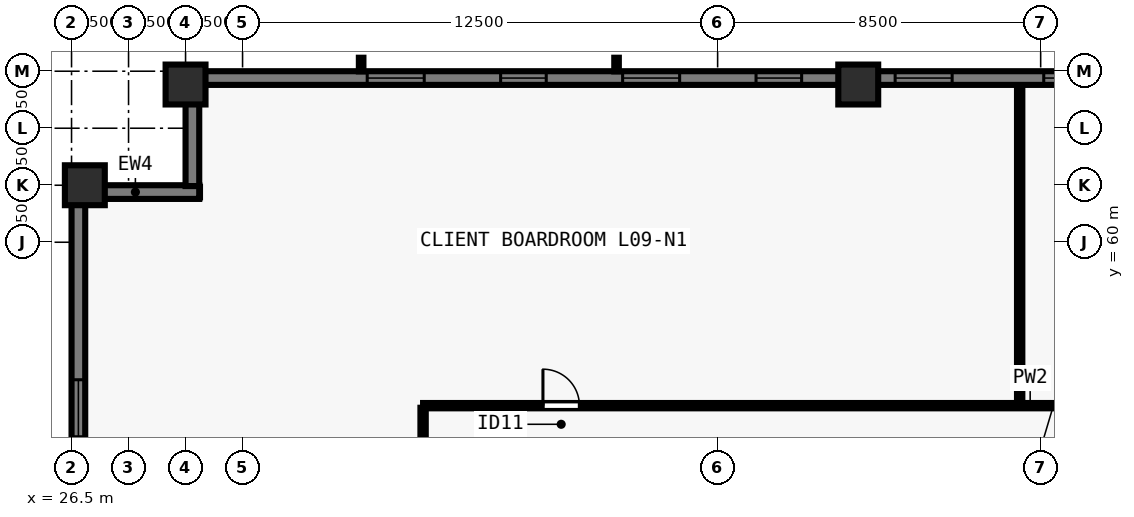
"""IFC4 building model, lengths in metres.
Left out: names, types, materials, properties, quantities, classifications, styles, units other than length and angle.
Written with IfcOpenShell. Run it as: python <this file> out.ifc"""

import sys

from ifc_helpers import new_model, si_unit, direction, frame, frame_2d, origin, origin_2d, place, context, subcontext, project, spatial, rectangle, extrude, element, fill, save


model = new_model("IFC4")
c1 = context("Model", 3, precision=1e-05, world=origin(), true_north=direction((0.0, 1.0)))
c2 = subcontext(c1, "Body", "Model", "MODEL_VIEW")
j1 = project(units=[si_unit("LENGTHUNIT", "METRE"), si_unit("PLANEANGLEUNIT", "RADIAN")], contexts=[c1])
p1 = place(None, origin())
s1 = spatial("IfcSite", under=j1, at=p1, CompositionType="ELEMENT")
p2 = place(p1, origin())
s2 = spatial("IfcBuilding", under=s1, at=p2, CompositionType="ELEMENT")
p3 = place(p2, frame((0.0, 0.0, 37.5)))
s3 = spatial("IfcBuildingStorey", under=s2, at=p3, CompositionType="ELEMENT", Elevation=37.5)
for number, where, z_axis, x_axis in (
    (1, (47.2, 64.15, 0.0), (0.0, 0.0, 1.0), (1.0, 0.0, 0.0)),
    (2, (29.5, 64.15, 0.0), (0.0, 0.0, 1.0), (1.0, 0.0, 0.0)),
    (3, (26.85, 61.5, 0.0), (0.0, 0.0, 1.0), (0.0, 1.0, 0.0)),
):
    element("IfcColumn", number, at=place(p3, frame(where, z_axis=z_axis, x_axis=x_axis)), inside=s3, PredefinedType="COLUMN", context=c2, shape_type="SweptSolid", body=[
        extrude(rectangle(XDim=1.05, YDim=1.05, at=origin_2d()), origin(), (0.0, 0.0, 1.0), 3.5),
    ])
p4 = place(p3, frame((26.68, 16.5, 0.0), z_axis=(0.0, 0.0, 1.0), x_axis=(0.0, 1.0, 0.0)))
e4 = element("IfcWall", 4, at=p4, inside=s3, PredefinedType="SOLIDWALL", context=c2, shape_type="SweptSolid", body=[
    extrude(rectangle(XDim=44.662, YDim=0.36, at=frame_2d((22.331, 0.0))), origin(), (0.0, 0.0, 1.0), 3.28),
])
p5 = place(p4, frame((4.78, 0.0, 0.8)))
e5 = element("IfcOpeningElement", 5, at=p5, cuts=e4, PredefinedType="OPENING", context=c2, shape_type="SweptSolid", body=[
    extrude(rectangle(XDim=1.5, YDim=1.544, at=frame_2d((0.75, 0.772))), frame((0.0, 0.19, 0.0), z_axis=(0.0, -1.0, 0.0), x_axis=(1.0, 0.0, 0.0)), (0.0, 0.0, 1.0), 0.38),
])
p6 = place(p4, frame((8.29, 0.0, 0.8)))
e6 = element("IfcOpeningElement", 6, at=p6, cuts=e4, PredefinedType="OPENING", context=c2, shape_type="SweptSolid", body=[
    extrude(rectangle(XDim=1.2, YDim=1.544, at=frame_2d((0.6, 0.772))), frame((0.0, 0.19, 0.0), z_axis=(0.0, -1.0, 0.0), x_axis=(1.0, 0.0, 0.0)), (0.0, 0.0, 1.0), 0.38),
])
p7 = place(p4, frame((11.5, 0.0, 0.8)))
e7 = element("IfcOpeningElement", 7, at=p7, cuts=e4, PredefinedType="OPENING", context=c2, shape_type="SweptSolid", body=[
    extrude(rectangle(XDim=1.5, YDim=1.544, at=frame_2d((0.75, 0.772))), frame((0.0, 0.19, 0.0), z_axis=(0.0, -1.0, 0.0), x_axis=(1.0, 0.0, 0.0)), (0.0, 0.0, 1.0), 0.38),
])
p8 = place(p4, frame((15.01, 0.0, 0.8)))
e8 = element("IfcOpeningElement", 8, at=p8, cuts=e4, PredefinedType="OPENING", context=c2, shape_type="SweptSolid", body=[
    extrude(rectangle(XDim=1.2, YDim=1.544, at=frame_2d((0.6, 0.772))), frame((0.0, 0.19, 0.0), z_axis=(0.0, -1.0, 0.0), x_axis=(1.0, 0.0, 0.0)), (0.0, 0.0, 1.0), 0.38),
])
p9 = place(p4, frame((18.671, 0.0, 0.8)))
e9 = element("IfcOpeningElement", 9, at=p9, cuts=e4, PredefinedType="OPENING", context=c2, shape_type="SweptSolid", body=[
    extrude(rectangle(XDim=1.5, YDim=1.544, at=frame_2d((0.75, 0.772))), frame((0.0, 0.19, 0.0), z_axis=(0.0, -1.0, 0.0), x_axis=(1.0, 0.0, 0.0)), (0.0, 0.0, 1.0), 0.38),
])
p10 = place(p4, frame((21.281, 0.0, 0.8)))
e10 = element("IfcOpeningElement", 10, at=p10, cuts=e4, PredefinedType="OPENING", context=c2, shape_type="SweptSolid", body=[
    extrude(rectangle(XDim=1.2, YDim=1.544, at=frame_2d((0.6, 0.772))), frame((0.0, 0.19, 0.0), z_axis=(0.0, -1.0, 0.0), x_axis=(1.0, 0.0, 0.0)), (0.0, 0.0, 1.0), 0.38),
])
p11 = place(p4, frame((24.941, 0.0, 0.8)))
e11 = element("IfcOpeningElement", 11, at=p11, cuts=e4, PredefinedType="OPENING", context=c2, shape_type="SweptSolid", body=[
    extrude(rectangle(XDim=1.5, YDim=1.544, at=frame_2d((0.75, 0.772))), frame((0.0, 0.19, 0.0), z_axis=(0.0, -1.0, 0.0), x_axis=(1.0, 0.0, 0.0)), (0.0, 0.0, 1.0), 0.38),
])
p12 = place(p4, frame((28.451, 0.0, 0.8)))
e12 = element("IfcOpeningElement", 12, at=p12, cuts=e4, PredefinedType="OPENING", context=c2, shape_type="SweptSolid", body=[
    extrude(rectangle(XDim=1.2, YDim=1.544, at=frame_2d((0.6, 0.772))), frame((0.0, 0.19, 0.0), z_axis=(0.0, -1.0, 0.0), x_axis=(1.0, 0.0, 0.0)), (0.0, 0.0, 1.0), 0.38),
])
p13 = place(p4, frame((31.662, 0.0, 0.8)))
e13 = element("IfcOpeningElement", 13, at=p13, cuts=e4, PredefinedType="OPENING", context=c2, shape_type="SweptSolid", body=[
    extrude(rectangle(XDim=1.5, YDim=1.544, at=frame_2d((0.75, 0.772))), frame((0.0, 0.19, 0.0), z_axis=(0.0, -1.0, 0.0), x_axis=(1.0, 0.0, 0.0)), (0.0, 0.0, 1.0), 0.38),
])
p14 = place(p4, frame((35.172, 0.0, 0.8)))
e14 = element("IfcOpeningElement", 14, at=p14, cuts=e4, PredefinedType="OPENING", context=c2, shape_type="SweptSolid", body=[
    extrude(rectangle(XDim=1.2, YDim=1.544, at=frame_2d((0.6, 0.772))), frame((0.0, 0.19, 0.0), z_axis=(0.0, -1.0, 0.0), x_axis=(1.0, 0.0, 0.0)), (0.0, 0.0, 1.0), 0.38),
])
p15 = place(p4, frame((38.382, 0.0, 0.8)))
e15 = element("IfcOpeningElement", 15, at=p15, cuts=e4, PredefinedType="OPENING", context=c2, shape_type="SweptSolid", body=[
    extrude(rectangle(XDim=1.5, YDim=1.544, at=frame_2d((0.75, 0.772))), frame((0.0, 0.19, 0.0), z_axis=(0.0, -1.0, 0.0), x_axis=(1.0, 0.0, 0.0)), (0.0, 0.0, 1.0), 0.38),
])
p16 = place(p3, frame((26.5, 61.32, 0.0), z_axis=(0.0, 0.0, 1.0), x_axis=(1.0, 0.0, 0.0)))
e16 = element("IfcWall", 16, at=p16, inside=s3, PredefinedType="SOLIDWALL", context=c2, shape_type="SweptSolid", body=[
    extrude(rectangle(XDim=3.36, YDim=0.36, at=frame_2d((1.68, 0.0))), origin(), (0.0, 0.0, 1.0), 3.28),
])
p17 = place(p3, frame((29.68, 61.478, 0.0), z_axis=(0.0, 0.0, 1.0), x_axis=(0.0, 1.0, 0.0)))
e17 = element("IfcWall", 17, at=p17, inside=s3, PredefinedType="SOLIDWALL", context=c2, shape_type="SweptSolid", body=[
    extrude(rectangle(XDim=2.684, YDim=0.36, at=frame_2d((1.342, 0.0))), origin(), (0.0, 0.0, 1.0), 3.28),
])
p18 = place(p3, frame((29.5, 64.32, 0.0), z_axis=(0.0, 0.0, 1.0), x_axis=(1.0, 0.0, 0.0)))
e18 = element("IfcWall", 18, at=p18, inside=s3, PredefinedType="SOLIDWALL", context=c2, shape_type="SweptSolid", body=[
    extrude(rectangle(XDim=44.662, YDim=0.36, at=frame_2d((22.331, 0.0))), origin(), (0.0, 0.0, 1.0), 3.28),
])
p19 = place(p18, frame((4.78, 0.0, 0.8)))
e19 = element("IfcOpeningElement", 19, at=p19, cuts=e18, PredefinedType="OPENING", context=c2, shape_type="SweptSolid", body=[
    extrude(rectangle(XDim=1.5, YDim=1.544, at=frame_2d((0.75, 0.772))), frame((0.0, 0.19, 0.0), z_axis=(0.0, -1.0, 0.0), x_axis=(1.0, 0.0, 0.0)), (0.0, 0.0, 1.0), 0.38),
])
p20 = place(p18, frame((8.29, 0.0, 0.8)))
e20 = element("IfcOpeningElement", 20, at=p20, cuts=e18, PredefinedType="OPENING", context=c2, shape_type="SweptSolid", body=[
    extrude(rectangle(XDim=1.2, YDim=1.544, at=frame_2d((0.6, 0.772))), frame((0.0, 0.19, 0.0), z_axis=(0.0, -1.0, 0.0), x_axis=(1.0, 0.0, 0.0)), (0.0, 0.0, 1.0), 0.38),
])
p21 = place(p18, frame((11.5, 0.0, 0.8)))
e21 = element("IfcOpeningElement", 21, at=p21, cuts=e18, PredefinedType="OPENING", context=c2, shape_type="SweptSolid", body=[
    extrude(rectangle(XDim=1.5, YDim=1.544, at=frame_2d((0.75, 0.772))), frame((0.0, 0.19, 0.0), z_axis=(0.0, -1.0, 0.0), x_axis=(1.0, 0.0, 0.0)), (0.0, 0.0, 1.0), 0.38),
])
p22 = place(p18, frame((15.01, 0.0, 0.8)))
e22 = element("IfcOpeningElement", 22, at=p22, cuts=e18, PredefinedType="OPENING", context=c2, shape_type="SweptSolid", body=[
    extrude(rectangle(XDim=1.2, YDim=1.544, at=frame_2d((0.6, 0.772))), frame((0.0, 0.19, 0.0), z_axis=(0.0, -1.0, 0.0), x_axis=(1.0, 0.0, 0.0)), (0.0, 0.0, 1.0), 0.38),
])
p23 = place(p18, frame((18.671, 0.0, 0.8)))
e23 = element("IfcOpeningElement", 23, at=p23, cuts=e18, PredefinedType="OPENING", context=c2, shape_type="SweptSolid", body=[
    extrude(rectangle(XDim=1.5, YDim=1.544, at=frame_2d((0.75, 0.772))), frame((0.0, 0.19, 0.0), z_axis=(0.0, -1.0, 0.0), x_axis=(1.0, 0.0, 0.0)), (0.0, 0.0, 1.0), 0.38),
])
p24 = place(p18, frame((22.581, 0.0, 0.8)))
e24 = element("IfcOpeningElement", 24, at=p24, cuts=e18, PredefinedType="OPENING", context=c2, shape_type="SweptSolid", body=[
    extrude(rectangle(XDim=1.2, YDim=1.544, at=frame_2d((0.6, 0.772))), frame((0.0, 0.19, 0.0), z_axis=(0.0, -1.0, 0.0), x_axis=(1.0, 0.0, 0.0)), (0.0, 0.0, 1.0), 0.38),
])
p25 = place(p18, frame((24.941, 0.0, 0.8)))
e25 = element("IfcOpeningElement", 25, at=p25, cuts=e18, PredefinedType="OPENING", context=c2, shape_type="SweptSolid", body=[
    extrude(rectangle(XDim=1.5, YDim=1.544, at=frame_2d((0.75, 0.772))), frame((0.0, 0.19, 0.0), z_axis=(0.0, -1.0, 0.0), x_axis=(1.0, 0.0, 0.0)), (0.0, 0.0, 1.0), 0.38),
])
p26 = place(p18, frame((28.451, 0.0, 0.8)))
e26 = element("IfcOpeningElement", 26, at=p26, cuts=e18, PredefinedType="OPENING", context=c2, shape_type="SweptSolid", body=[
    extrude(rectangle(XDim=1.2, YDim=1.544, at=frame_2d((0.6, 0.772))), frame((0.0, 0.19, 0.0), z_axis=(0.0, -1.0, 0.0), x_axis=(1.0, 0.0, 0.0)), (0.0, 0.0, 1.0), 0.38),
])
p27 = place(p18, frame((31.662, 0.0, 0.8)))
e27 = element("IfcOpeningElement", 27, at=p27, cuts=e18, PredefinedType="OPENING", context=c2, shape_type="SweptSolid", body=[
    extrude(rectangle(XDim=1.5, YDim=1.544, at=frame_2d((0.75, 0.772))), frame((0.0, 0.19, 0.0), z_axis=(0.0, -1.0, 0.0), x_axis=(1.0, 0.0, 0.0)), (0.0, 0.0, 1.0), 0.38),
])
p28 = place(p18, frame((35.172, 0.0, 0.8)))
e28 = element("IfcOpeningElement", 28, at=p28, cuts=e18, PredefinedType="OPENING", context=c2, shape_type="SweptSolid", body=[
    extrude(rectangle(XDim=1.2, YDim=1.544, at=frame_2d((0.6, 0.772))), frame((0.0, 0.19, 0.0), z_axis=(0.0, -1.0, 0.0), x_axis=(1.0, 0.0, 0.0)), (0.0, 0.0, 1.0), 0.38),
])
p29 = place(p18, frame((38.382, 0.0, 0.8)))
e29 = element("IfcOpeningElement", 29, at=p29, cuts=e18, PredefinedType="OPENING", context=c2, shape_type="SweptSolid", body=[
    extrude(rectangle(XDim=1.5, YDim=1.544, at=frame_2d((0.75, 0.772))), frame((0.0, 0.19, 0.0), z_axis=(0.0, -1.0, 0.0), x_axis=(1.0, 0.0, 0.0)), (0.0, 0.0, 1.0), 0.38),
])
p30 = place(p3, frame((35.75, 55.7, 0.0), z_axis=(0.0, 0.0, 1.0), x_axis=(1.0, 0.0, 0.0)))
e30 = element("IfcWall", 30, at=p30, inside=s3, PredefinedType="PARTITIONING", context=c2, shape_type="SweptSolid", body=[
    extrude(rectangle(XDim=32.5, YDim=0.14, at=frame_2d((16.25, 0.0))), origin(), (0.0, 0.0, 1.0), 3.28),
])
p31 = place(p30, frame((3.154, 0.0, 0.0)))
e31 = element("IfcOpeningElement", 31, at=p31, cuts=e30, PredefinedType="OPENING", context=c2, shape_type="SweptSolid", body=[
    extrude(rectangle(XDim=0.96, YDim=2.12, at=frame_2d((0.48, 1.06))), frame((0.0, 0.08, 0.0), z_axis=(0.0, -1.0, 0.0), x_axis=(1.0, 0.0, 0.0)), (0.0, 0.0, 1.0), 0.16),
])
p32 = place(p30, frame((27.834, 0.0, 0.0)))
e32 = element("IfcOpeningElement", 32, at=p32, cuts=e30, PredefinedType="OPENING", context=c2, shape_type="SweptSolid", body=[
    extrude(rectangle(XDim=0.96, YDim=2.12, at=frame_2d((0.48, 1.06))), frame((0.0, 0.08, 0.0), z_axis=(0.0, -1.0, 0.0), x_axis=(1.0, 0.0, 0.0)), (0.0, 0.0, 1.0), 0.16),
])
p33 = place(p3, frame((35.75, 22.355, 0.0), z_axis=(0.0, 0.0, 1.0), x_axis=(0.0, 1.0, 0.0)))
e33 = element("IfcWall", 33, at=p33, inside=s3, PredefinedType="PARTITIONING", context=c2, shape_type="SweptSolid", body=[
    extrude(rectangle(XDim=33.29, YDim=0.14, at=frame_2d((16.645, 0.0))), origin(), (0.0, 0.0, 1.0), 3.28),
])
p34 = place(p33, frame((8.058, 0.0, 0.0)))
e34 = element("IfcOpeningElement", 34, at=p34, cuts=e33, PredefinedType="OPENING", context=c2, shape_type="SweptSolid", body=[
    extrude(rectangle(XDim=0.96, YDim=2.12, at=frame_2d((0.48, 1.06))), frame((0.0, 0.08, 0.0), z_axis=(0.0, -1.0, 0.0), x_axis=(1.0, 0.0, 0.0)), (0.0, 0.0, 1.0), 0.16),
])
p35 = place(p33, frame((24.658, 0.0, 0.0)))
e35 = element("IfcOpeningElement", 35, at=p35, cuts=e33, PredefinedType="OPENING", context=c2, shape_type="SweptSolid", body=[
    extrude(rectangle(XDim=0.96, YDim=2.12, at=frame_2d((0.48, 1.06))), frame((0.0, 0.08, 0.0), z_axis=(0.0, -1.0, 0.0), x_axis=(1.0, 0.0, 0.0)), (0.0, 0.0, 1.0), 0.16),
])
p36 = place(p3, frame((51.448, 55.8, 0.0), z_axis=(0.0, 0.0, 1.0), x_axis=(0.0, 1.0, 0.0)))
e36 = element("IfcWall", 36, at=p36, inside=s3, PredefinedType="PARTITIONING", context=c2, shape_type="SweptSolid", body=[
    extrude(rectangle(XDim=8.28, YDim=0.14, at=frame_2d((4.14, 0.0))), origin(), (0.0, 0.0, 1.0), 3.28),
])
p37 = place(p15, origin())
e37 = element("IfcWindow", 37, at=p37, inside=s3, PartitioningType="SINGLE_PANEL", PredefinedType="WINDOW", context=c2, shape_type="SweptSolid", body=[
    extrude(rectangle(XDim=1.5, YDim=1.544, at=frame_2d((0.75, 0.772))), frame((0.0, -0.05, 0.0), z_axis=(0.0, -1.0, 0.0), x_axis=(1.0, 0.0, 0.0)), (0.0, 0.0, 1.0), 0.06),
])
fill(e15, e37)
p38 = place(p19, origin())
e38 = element("IfcWindow", 38, at=p38, inside=s3, PartitioningType="SINGLE_PANEL", PredefinedType="WINDOW", context=c2, shape_type="SweptSolid", body=[
    extrude(rectangle(XDim=1.5, YDim=1.544, at=frame_2d((0.75, 0.772))), frame((0.0, -0.05, 0.0), z_axis=(0.0, -1.0, 0.0), x_axis=(1.0, 0.0, 0.0)), (0.0, 0.0, 1.0), 0.06),
])
fill(e19, e38)
p39 = place(p20, origin())
e39 = element("IfcWindow", 39, at=p39, inside=s3, PartitioningType="SINGLE_PANEL", PredefinedType="WINDOW", context=c2, shape_type="SweptSolid", body=[
    extrude(rectangle(XDim=1.2, YDim=1.544, at=frame_2d((0.6, 0.772))), frame((0.0, -0.05, 0.0), z_axis=(0.0, -1.0, 0.0), x_axis=(1.0, 0.0, 0.0)), (0.0, 0.0, 1.0), 0.06),
])
fill(e20, e39)
p40 = place(p21, origin())
e40 = element("IfcWindow", 40, at=p40, inside=s3, PartitioningType="SINGLE_PANEL", PredefinedType="WINDOW", context=c2, shape_type="SweptSolid", body=[
    extrude(rectangle(XDim=1.5, YDim=1.544, at=frame_2d((0.75, 0.772))), frame((0.0, -0.05, 0.0), z_axis=(0.0, -1.0, 0.0), x_axis=(1.0, 0.0, 0.0)), (0.0, 0.0, 1.0), 0.06),
])
fill(e21, e40)
p41 = place(p22, origin())
e41 = element("IfcWindow", 41, at=p41, inside=s3, PartitioningType="SINGLE_PANEL", PredefinedType="WINDOW", context=c2, shape_type="SweptSolid", body=[
    extrude(rectangle(XDim=1.2, YDim=1.544, at=frame_2d((0.6, 0.772))), frame((0.0, -0.05, 0.0), z_axis=(0.0, -1.0, 0.0), x_axis=(1.0, 0.0, 0.0)), (0.0, 0.0, 1.0), 0.06),
])
fill(e22, e41)
p42 = place(p23, origin())
e42 = element("IfcWindow", 42, at=p42, inside=s3, PartitioningType="SINGLE_PANEL", PredefinedType="WINDOW", context=c2, shape_type="SweptSolid", body=[
    extrude(rectangle(XDim=1.5, YDim=1.544, at=frame_2d((0.75, 0.772))), frame((0.0, -0.05, 0.0), z_axis=(0.0, -1.0, 0.0), x_axis=(1.0, 0.0, 0.0)), (0.0, 0.0, 1.0), 0.06),
])
fill(e23, e42)
p43 = place(p24, origin())
e43 = element("IfcWindow", 43, at=p43, inside=s3, PartitioningType="SINGLE_PANEL", PredefinedType="WINDOW", context=c2, shape_type="SweptSolid", body=[
    extrude(rectangle(XDim=1.2, YDim=1.544, at=frame_2d((0.6, 0.772))), frame((0.0, -0.05, 0.0), z_axis=(0.0, -1.0, 0.0), x_axis=(1.0, 0.0, 0.0)), (0.0, 0.0, 1.0), 0.06),
])
fill(e24, e43)
p44 = place(p31, origin())
e44 = element("IfcDoor", 44, at=p44, inside=s3, OperationType="SINGLE_SWING_LEFT", PredefinedType="DOOR", context=c2, shape_type="SweptSolid", body=[
    extrude(rectangle(XDim=0.96, YDim=2.12, at=frame_2d((0.48, 1.06))), frame((0.0, 0.025, 0.0), z_axis=(0.0, -1.0, 0.0), x_axis=(1.0, 0.0, 0.0)), (0.0, 0.0, 1.0), 0.05),
])
fill(e31, e44)
save(model, sys.argv[1])
